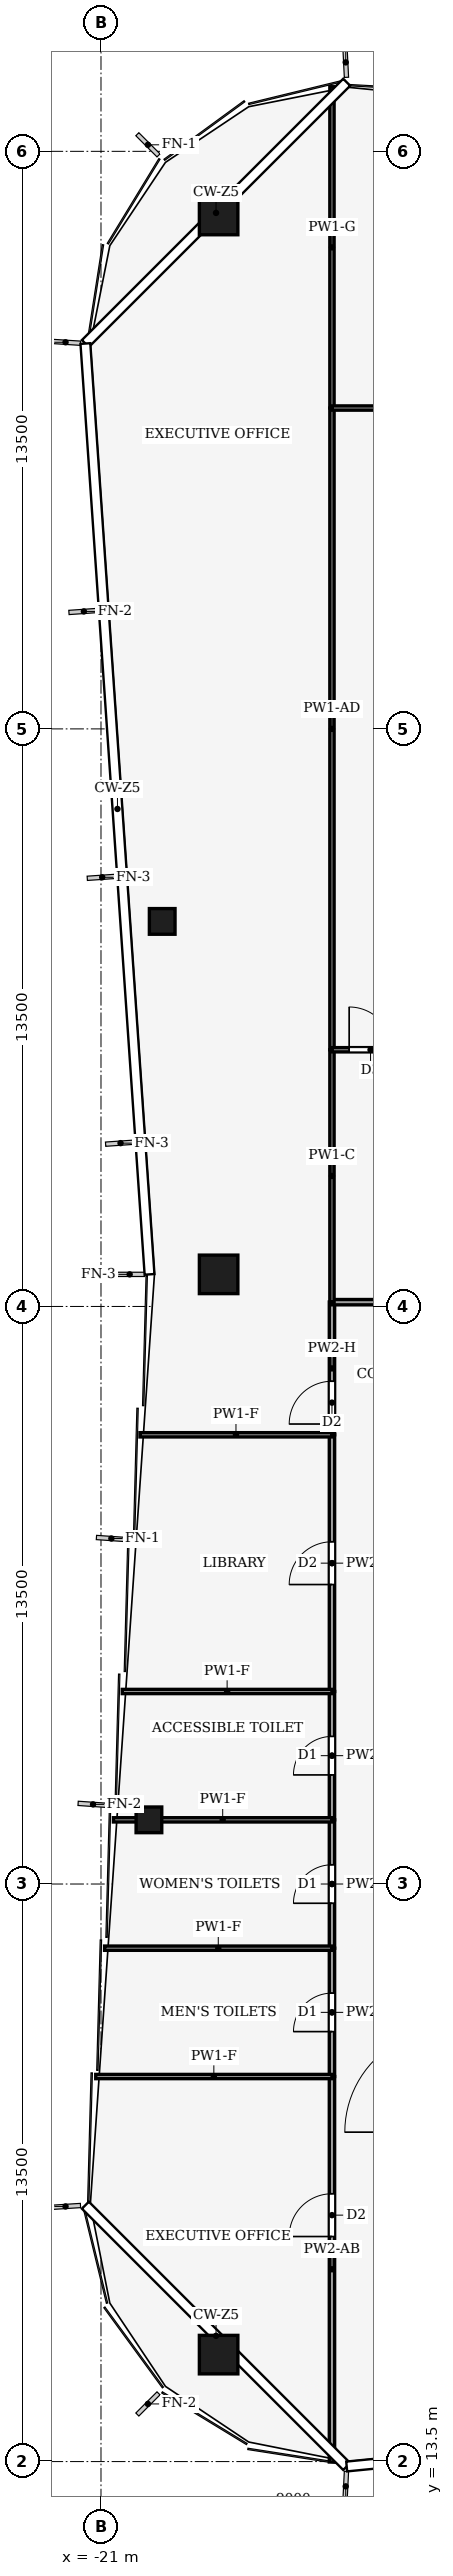
"""IFC4 building model, lengths in metres.
Left out: names, types, materials, properties, quantities, classifications, styles, units other than length and angle.
Written with IfcOpenShell. Run it as: python <this file> out.ifc"""

import sys

from ifc_helpers import new_model, si_unit, direction, frame, frame_2d, origin, origin_2d, place, context, subcontext, project, spatial, rectangle, hollow_rectangle, extrude, element, fill, save


model = new_model("IFC4")
c1 = context("Model", 3, precision=1e-05, world=origin(), true_north=direction((0.0, 1.0)))
c2 = subcontext(c1, "Body", "Model", "MODEL_VIEW")
j1 = project(units=[si_unit("LENGTHUNIT", "METRE"), si_unit("PLANEANGLEUNIT", "RADIAN")], contexts=[c1])
p1 = place(None, origin())
s1 = spatial("IfcSite", under=j1, at=p1, CompositionType="ELEMENT")
p2 = place(p1, origin())
s2 = spatial("IfcBuilding", under=s1, at=p2, CompositionType="ELEMENT")
p3 = place(p2, frame((0.0, 0.0, 318.0)))
s3 = spatial("IfcBuildingStorey", under=s2, at=p3, CompositionType="ELEMENT", Elevation=318.0)
for number, where, z_axis, x_axis in (
    (1, (-18.25, 66.0, 0.0), (0.0, 0.0, 1.0), (1.0, 0.0, 0.0)),
    (2, (-18.25, 16.0, 0.0), (0.0, 0.0, 1.0), (1.0, 0.0, 0.0)),
    (3, (-18.25, 41.25, 0.0), (0.0, 0.0, 1.0), (1.0, 0.0, 0.0)),
):
    element("IfcColumn", number, at=place(p3, frame(where, z_axis=z_axis, x_axis=x_axis)), inside=s3, PredefinedType="COLUMN", context=c2, shape_type="SweptSolid", body=[
        extrude(hollow_rectangle(XDim=0.9, YDim=0.9, WallThickness=0.04, at=origin_2d()), origin(), (0.0, 0.0, 1.0), 4.0),
    ])
for number, where, z_axis, x_axis in (
    (4, (-19.879, 28.5, 0.0), (0.0, 0.0, 1.0), (1.0, 0.0, 0.0)),
    (5, (-19.569, 49.5, 0.0), (0.0, 0.0, 1.0), (1.0, 0.0, 0.0)),
):
    element("IfcColumn", number, at=place(p3, frame(where, z_axis=z_axis, x_axis=x_axis)), inside=s3, PredefinedType="COLUMN", context=c2, shape_type="SweptSolid", body=[
        extrude(hollow_rectangle(XDim=0.6, YDim=0.6, WallThickness=0.025, at=origin_2d()), origin(), (0.0, 0.0, 1.0), 4.0),
    ])
p4 = place(p3, frame((-15.6, 13.49, 0.0), z_axis=(0.0, 0.0, 1.0), x_axis=(0.0, 1.0, 0.0)))
e6 = element("IfcWall", 6, at=p4, inside=s3, PredefinedType="PARTITIONING", context=c2, shape_type="SweptSolid", body=[
    extrude(rectangle(XDim=9.01, YDim=0.125, at=frame_2d((4.505, 0.0))), origin(), (0.0, 0.0, 1.0), 2.93),
])
p5 = place(p4, frame((5.271, 0.0, 0.0)))
e7 = element("IfcOpeningElement", 7, at=p5, cuts=e6, PredefinedType="OPENING", context=c2, shape_type="SweptSolid", body=[
    extrude(rectangle(XDim=1.0, YDim=2.1, at=frame_2d((0.5, 1.05))), frame((0.0, 0.073, 0.0), z_axis=(0.0, -1.0, 0.0), x_axis=(1.0, 0.0, 0.0)), (0.0, 0.0, 1.0), 0.145),
])
p6 = place(p3, frame((-15.6, 22.5, 0.0), z_axis=(0.0, 0.0, 1.0), x_axis=(0.0, 1.0, 0.0)))
e8 = element("IfcWall", 8, at=p6, inside=s3, PredefinedType="PARTITIONING", context=c2, shape_type="SweptSolid", body=[
    extrude(rectangle(XDim=3.0, YDim=0.125, at=frame_2d((1.5, 0.0))), origin(), (0.0, 0.0, 1.0), 3.54),
])
p7 = place(p6, frame((1.05, 0.0, 0.0)))
e9 = element("IfcOpeningElement", 9, at=p7, cuts=e8, PredefinedType="OPENING", context=c2, shape_type="SweptSolid", body=[
    extrude(rectangle(XDim=0.9, YDim=2.1, at=frame_2d((0.45, 1.05))), frame((0.0, 0.073, 0.0), z_axis=(0.0, -1.0, 0.0), x_axis=(1.0, 0.0, 0.0)), (0.0, 0.0, 1.0), 0.145),
])
p8 = place(p3, frame((-15.6, 25.5, 0.0), z_axis=(0.0, 0.0, 1.0), x_axis=(0.0, 1.0, 0.0)))
e10 = element("IfcWall", 10, at=p8, inside=s3, PredefinedType="PARTITIONING", context=c2, shape_type="SweptSolid", body=[
    extrude(rectangle(XDim=3.0, YDim=0.125, at=frame_2d((1.5, 0.0))), origin(), (0.0, 0.0, 1.0), 3.87),
])
p9 = place(p8, frame((1.05, 0.0, 0.0)))
e11 = element("IfcOpeningElement", 11, at=p9, cuts=e10, PredefinedType="OPENING", context=c2, shape_type="SweptSolid", body=[
    extrude(rectangle(XDim=0.9, YDim=2.1, at=frame_2d((0.45, 1.05))), frame((0.0, 0.073, 0.0), z_axis=(0.0, -1.0, 0.0), x_axis=(1.0, 0.0, 0.0)), (0.0, 0.0, 1.0), 0.145),
])
p10 = place(p3, frame((-15.6, 28.5, 0.0), z_axis=(0.0, 0.0, 1.0), x_axis=(0.0, 1.0, 0.0)))
e12 = element("IfcWall", 12, at=p10, inside=s3, PredefinedType="PARTITIONING", context=c2, shape_type="SweptSolid", body=[
    extrude(rectangle(XDim=3.0, YDim=0.125, at=frame_2d((1.5, 0.0))), origin(), (0.0, 0.0, 1.0), 3.87),
])
p11 = place(p10, frame((1.05, 0.0, 0.0)))
e13 = element("IfcOpeningElement", 13, at=p11, cuts=e12, PredefinedType="OPENING", context=c2, shape_type="SweptSolid", body=[
    extrude(rectangle(XDim=0.9, YDim=2.1, at=frame_2d((0.45, 1.05))), frame((0.0, 0.073, 0.0), z_axis=(0.0, -1.0, 0.0), x_axis=(1.0, 0.0, 0.0)), (0.0, 0.0, 1.0), 0.145),
])
p12 = place(p3, frame((-15.6, 31.5, 0.0), z_axis=(0.0, 0.0, 1.0), x_axis=(0.0, 1.0, 0.0)))
e14 = element("IfcWall", 14, at=p12, inside=s3, PredefinedType="PARTITIONING", context=c2, shape_type="SweptSolid", body=[
    extrude(rectangle(XDim=6.0, YDim=0.125, at=frame_2d((3.0, 0.0))), origin(), (0.0, 0.0, 1.0), 3.54),
])
p13 = place(p12, frame((2.5, 0.0, 0.0)))
e15 = element("IfcOpeningElement", 15, at=p13, cuts=e14, PredefinedType="OPENING", context=c2, shape_type="SweptSolid", body=[
    extrude(rectangle(XDim=1.0, YDim=2.1, at=frame_2d((0.5, 1.05))), frame((0.0, 0.073, 0.0), z_axis=(0.0, -1.0, 0.0), x_axis=(1.0, 0.0, 0.0)), (0.0, 0.0, 1.0), 0.145),
])
p14 = place(p3, frame((-15.6, 37.5, 0.0), z_axis=(0.0, 0.0, 1.0), x_axis=(0.0, 1.0, 0.0)))
e16 = element("IfcWall", 16, at=p14, inside=s3, PredefinedType="PARTITIONING", context=c2, shape_type="SweptSolid", body=[
    extrude(rectangle(XDim=3.104, YDim=0.125, at=frame_2d((1.552, 0.0))), origin(), (0.0, 0.0, 1.0), 3.14),
])
p15 = place(p14, frame((0.252, 0.0, 0.0)))
e17 = element("IfcOpeningElement", 17, at=p15, cuts=e16, PredefinedType="OPENING", context=c2, shape_type="SweptSolid", body=[
    extrude(rectangle(XDim=1.0, YDim=2.1, at=frame_2d((0.5, 1.05))), frame((0.0, 0.073, 0.0), z_axis=(0.0, -1.0, 0.0), x_axis=(1.0, 0.0, 0.0)), (0.0, 0.0, 1.0), 0.145),
])
p16 = place(p3, frame((-15.6, 40.6, 0.0), z_axis=(0.0, 0.0, 1.0), x_axis=(1.0, 0.0, 0.0)))
e18 = element("IfcWall", 18, at=p16, inside=s3, PredefinedType="PARTITIONING", context=c2, shape_type="SweptSolid", body=[
    extrude(rectangle(XDim=6.6, YDim=0.125, at=frame_2d((3.3, 0.0))), origin(), (0.0, 0.0, 1.0), 3.39),
])
p17 = place(p16, frame((2.8, 0.0, 0.0)))
e19 = element("IfcOpeningElement", 19, at=p17, cuts=e18, PredefinedType="OPENING", context=c2, shape_type="SweptSolid", body=[
    extrude(rectangle(XDim=1.0, YDim=2.1, at=frame_2d((0.5, 1.05))), frame((0.0, 0.073, 0.0), z_axis=(0.0, -1.0, 0.0), x_axis=(1.0, 0.0, 0.0)), (0.0, 0.0, 1.0), 0.145),
])
p18 = place(p3, frame((-15.6, 22.5, 0.0), z_axis=(0.0, 0.0, 1.0), x_axis=(-1.0, 0.0, 0.0)))
e20 = element("IfcWall", 20, at=p18, inside=s3, PredefinedType="PARTITIONING", context=c2, shape_type="SweptSolid", body=[
    extrude(rectangle(XDim=5.523, YDim=0.1, at=frame_2d((2.761, 0.0))), origin(), (0.0, 0.0, 1.0), 3.04),
])
p19 = place(p3, frame((-15.6, 25.5, 0.0), z_axis=(0.0, 0.0, 1.0), x_axis=(-1.0, 0.0, 0.0)))
e21 = element("IfcWall", 21, at=p19, inside=s3, PredefinedType="PARTITIONING", context=c2, shape_type="SweptSolid", body=[
    extrude(rectangle(XDim=5.316, YDim=0.1, at=frame_2d((2.658, 0.0))), origin(), (0.0, 0.0, 1.0), 3.04),
])
p20 = place(p3, frame((-15.6, 28.5, 0.0), z_axis=(0.0, 0.0, 1.0), x_axis=(-1.0, 0.0, 0.0)))
e22 = element("IfcWall", 22, at=p20, inside=s3, PredefinedType="PARTITIONING", context=c2, shape_type="SweptSolid", body=[
    extrude(rectangle(XDim=5.109, YDim=0.1, at=frame_2d((2.555, 0.0))), origin(), (0.0, 0.0, 1.0), 3.04),
])
p21 = place(p3, frame((-15.6, 31.5, 0.0), z_axis=(0.0, 0.0, 1.0), x_axis=(-1.0, 0.0, 0.0)))
e23 = element("IfcWall", 23, at=p21, inside=s3, PredefinedType="PARTITIONING", context=c2, shape_type="SweptSolid", body=[
    extrude(rectangle(XDim=4.902, YDim=0.1, at=frame_2d((2.451, 0.0))), origin(), (0.0, 0.0, 1.0), 3.04),
])
p22 = place(p3, frame((-15.6, 37.5, 0.0), z_axis=(0.0, 0.0, 1.0), x_axis=(-1.0, 0.0, 0.0)))
e24 = element("IfcWall", 24, at=p22, inside=s3, PredefinedType="PARTITIONING", context=c2, shape_type="SweptSolid", body=[
    extrude(rectangle(XDim=4.489, YDim=0.1, at=frame_2d((2.244, 0.0))), origin(), (0.0, 0.0, 1.0), 3.04),
])
p23 = place(p3, frame((-15.6, 40.6, 0.0), z_axis=(0.0, 0.0, 1.0), x_axis=(0.0, 1.0, 0.0)))
e25 = element("IfcWall", 25, at=p23, inside=s3, PredefinedType="PARTITIONING", context=c2, shape_type="SweptSolid", body=[
    extrude(rectangle(XDim=5.9, YDim=0.1, at=frame_2d((2.95, 0.0))), origin(), (0.0, 0.0, 1.0), 3.87),
])
p24 = place(p3, frame((-15.6, 46.5, 0.0), z_axis=(0.0, 0.0, 1.0), x_axis=(0.0, 1.0, 0.0)))
e26 = element("IfcWall", 26, at=p24, inside=s3, PredefinedType="PARTITIONING", context=c2, shape_type="SweptSolid", body=[
    extrude(rectangle(XDim=15.0, YDim=0.1, at=frame_2d((7.5, 0.0))), origin(), (0.0, 0.0, 1.0), 3.35),
])
p25 = place(p3, frame((-15.6, 61.5, 0.0), z_axis=(0.0, 0.0, 1.0), x_axis=(0.0, 1.0, 0.0)))
e27 = element("IfcWall", 27, at=p25, inside=s3, PredefinedType="PARTITIONING", context=c2, shape_type="SweptSolid", body=[
    extrude(rectangle(XDim=7.51, YDim=0.1, at=frame_2d((3.755, 0.0))), origin(), (0.0, 0.0, 1.0), 2.93),
])
p26 = place(p3, frame((-15.6, 46.5, 0.0), z_axis=(0.0, 0.0, 1.0), x_axis=(1.0, 0.0, 0.0)))
e28 = element("IfcWall", 28, at=p26, inside=s3, PredefinedType="PARTITIONING", context=c2, shape_type="SweptSolid", body=[
    extrude(rectangle(XDim=6.604, YDim=0.1, at=frame_2d((3.302, 0.0))), origin(), (0.0, 0.0, 1.0), 3.39),
])
p27 = place(p26, frame((0.402, 0.0, 0.0)))
e29 = element("IfcOpeningElement", 29, at=p27, cuts=e28, PredefinedType="OPENING", context=c2, shape_type="SweptSolid", body=[
    extrude(rectangle(XDim=1.0, YDim=2.1, at=frame_2d((0.5, 1.05))), frame((0.0, 0.06, 0.0), z_axis=(0.0, -1.0, 0.0), x_axis=(1.0, 0.0, 0.0)), (0.0, 0.0, 1.0), 0.12),
])
p28 = place(p3, frame((-15.6, 61.5, 0.0), z_axis=(0.0, 0.0, 1.0), x_axis=(1.0, 0.0, 0.0)))
e30 = element("IfcWall", 30, at=p28, inside=s3, PredefinedType="PARTITIONING", context=c2, shape_type="SweptSolid", body=[
    extrude(rectangle(XDim=9.6, YDim=0.1, at=frame_2d((4.8, 0.0))), origin(), (0.0, 0.0, 1.0), 3.24),
])
p29 = place(p28, frame((4.3, 0.0, 0.0)))
e31 = element("IfcOpeningElement", 31, at=p29, cuts=e30, PredefinedType="OPENING", context=c2, shape_type="SweptSolid", body=[
    extrude(rectangle(XDim=1.0, YDim=2.1, at=frame_2d((0.5, 1.05))), frame((0.0, 0.06, 0.0), z_axis=(0.0, -1.0, 0.0), x_axis=(1.0, 0.0, 0.0)), (0.0, 0.0, 1.0), 0.12),
])
p30 = place(p5, origin())
e32 = element("IfcDoor", 32, at=p30, inside=s3, OperationType="SINGLE_SWING_RIGHT", PredefinedType="DOOR", context=c2, shape_type="SweptSolid", body=[
    extrude(rectangle(XDim=1.0, YDim=2.1, at=frame_2d((0.5, 1.05))), frame((0.0, 0.025, 0.0), z_axis=(0.0, -1.0, 0.0), x_axis=(1.0, 0.0, 0.0)), (0.0, 0.0, 1.0), 0.05),
])
fill(e7, e32)
p31 = place(p7, origin())
e33 = element("IfcDoor", 33, at=p31, inside=s3, OperationType="SINGLE_SWING_RIGHT", PredefinedType="DOOR", context=c2, shape_type="SweptSolid", body=[
    extrude(rectangle(XDim=0.9, YDim=2.1, at=frame_2d((0.45, 1.05))), frame((0.0, 0.025, 0.0), z_axis=(0.0, -1.0, 0.0), x_axis=(1.0, 0.0, 0.0)), (0.0, 0.0, 1.0), 0.05),
])
fill(e9, e33)
p32 = place(p9, origin())
e34 = element("IfcDoor", 34, at=p32, inside=s3, OperationType="SINGLE_SWING_LEFT", PredefinedType="DOOR", context=c2, shape_type="SweptSolid", body=[
    extrude(rectangle(XDim=0.9, YDim=2.1, at=frame_2d((0.45, 1.05))), frame((0.0, 0.025, 0.0), z_axis=(0.0, -1.0, 0.0), x_axis=(1.0, 0.0, 0.0)), (0.0, 0.0, 1.0), 0.05),
])
fill(e11, e34)
p33 = place(p11, origin())
e35 = element("IfcDoor", 35, at=p33, inside=s3, OperationType="SINGLE_SWING_RIGHT", PredefinedType="DOOR", context=c2, shape_type="SweptSolid", body=[
    extrude(rectangle(XDim=0.9, YDim=2.1, at=frame_2d((0.45, 1.05))), frame((0.0, 0.025, 0.0), z_axis=(0.0, -1.0, 0.0), x_axis=(1.0, 0.0, 0.0)), (0.0, 0.0, 1.0), 0.05),
])
fill(e13, e35)
p34 = place(p13, origin())
e36 = element("IfcDoor", 36, at=p34, inside=s3, OperationType="SINGLE_SWING_LEFT", PredefinedType="DOOR", context=c2, shape_type="SweptSolid", body=[
    extrude(rectangle(XDim=1.0, YDim=2.1, at=frame_2d((0.5, 1.05))), frame((0.0, 0.025, 0.0), z_axis=(0.0, -1.0, 0.0), x_axis=(1.0, 0.0, 0.0)), (0.0, 0.0, 1.0), 0.05),
])
fill(e15, e36)
p35 = place(p15, origin())
e37 = element("IfcDoor", 37, at=p35, inside=s3, OperationType="SINGLE_SWING_LEFT", PredefinedType="DOOR", context=c2, shape_type="SweptSolid", body=[
    extrude(rectangle(XDim=1.0, YDim=2.1, at=frame_2d((0.5, 1.05))), frame((0.0, 0.025, 0.0), z_axis=(0.0, -1.0, 0.0), x_axis=(1.0, 0.0, 0.0)), (0.0, 0.0, 1.0), 0.05),
])
fill(e17, e37)
p36 = place(p27, origin())
e38 = element("IfcDoor", 38, at=p36, inside=s3, OperationType="SINGLE_SWING_LEFT", PredefinedType="DOOR", context=c2, shape_type="SweptSolid", body=[
    extrude(rectangle(XDim=1.0, YDim=2.1, at=frame_2d((0.5, 1.05))), frame((0.0, 0.025, 0.0), z_axis=(0.0, -1.0, 0.0), x_axis=(1.0, 0.0, 0.0)), (0.0, 0.0, 1.0), 0.05),
])
fill(e29, e38)
save(model, sys.argv[1])
